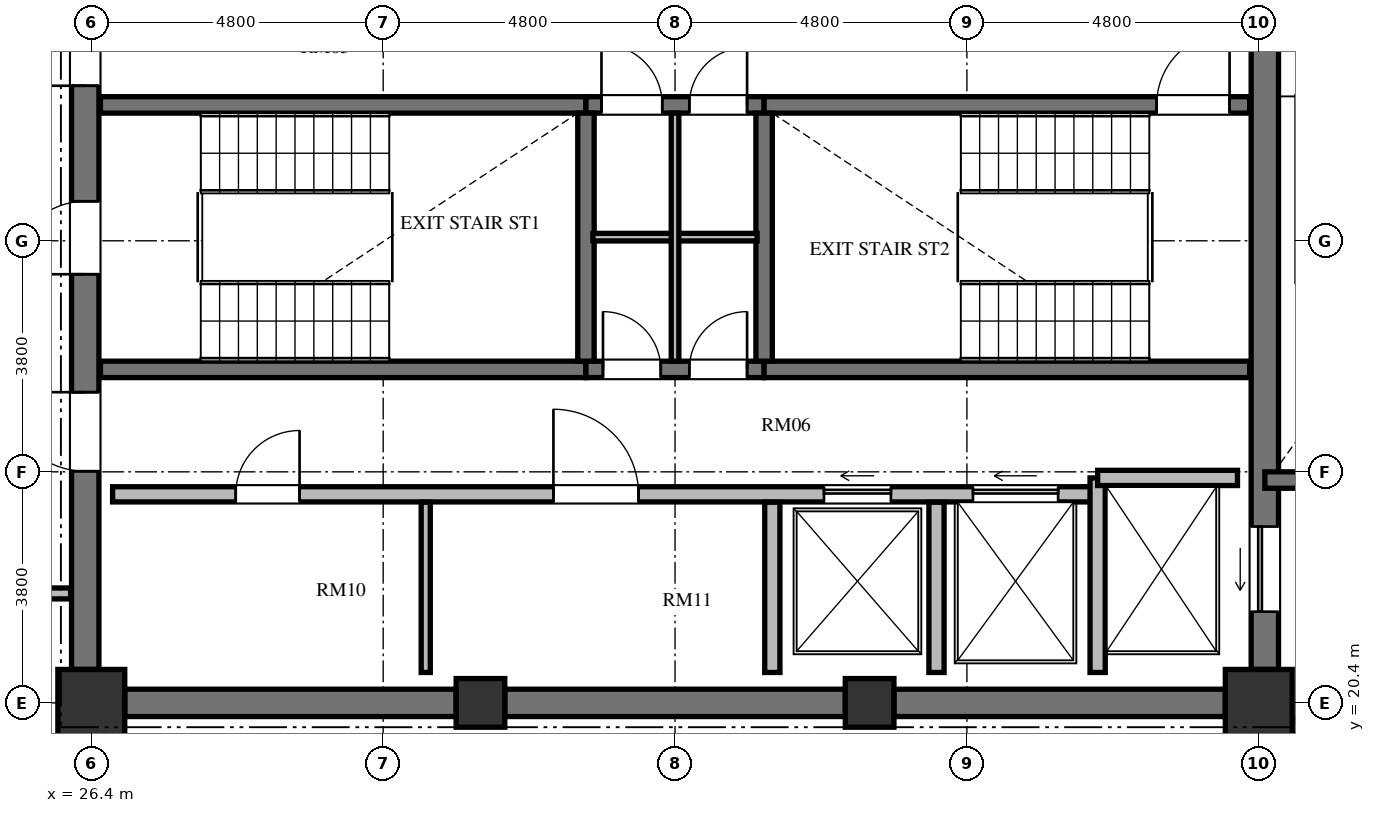
"""IFC4 building model, lengths in metres.
Left out: names, types, materials, properties, quantities, classifications, styles, units other than length and angle.
Written with IfcOpenShell. Run it as: python <this file> out.ifc"""

import sys

from ifc_helpers import new_model, si_unit, direction, frame, frame_2d, origin, origin_2d, place, context, subcontext, project, spatial, rectangle, extrude, element, fill, save


model = new_model("IFC4")
c1 = context("Model", 3, precision=1e-05, world=origin(), true_north=direction((0.0, 1.0)))
c2 = subcontext(c1, "Body", "Model", "MODEL_VIEW")
j1 = project(units=[si_unit("LENGTHUNIT", "METRE"), si_unit("PLANEANGLEUNIT", "RADIAN")], contexts=[c1])
p1 = place(None, origin())
s1 = spatial("IfcSite", under=j1, at=p1, CompositionType="ELEMENT")
p2 = place(p1, origin())
s2 = spatial("IfcBuilding", under=s1, at=p2, CompositionType="ELEMENT")
p3 = place(p2, frame((0.0, 0.0, 280.56)))
s3 = spatial("IfcBuildingStorey", under=s2, at=p3, CompositionType="ELEMENT", Elevation=280.56)
p4 = place(p3, frame((26.4, 20.4, 0.0), z_axis=(0.0, 0.0, 1.0), x_axis=(1.0, 0.0, 0.0)))
e1 = element("IfcColumn", 1, at=p4, inside=s3, PredefinedType="COLUMN", context=c2, shape_type="SweptSolid", body=[
    extrude(rectangle(XDim=1.1, YDim=1.1, at=origin_2d()), origin(), (0.0, 0.0, 1.0), 3.648),
])
for number, where, z_axis, x_axis in (
    (2, (32.8, 20.4, 0.0), (0.0, 0.0, 1.0), (1.0, 0.0, 0.0)),
    (3, (39.2, 20.4, 0.0), (0.0, 0.0, 1.0), (1.0, 0.0, 0.0)),
):
    element("IfcColumn", number, at=place(p3, frame(where, z_axis=z_axis, x_axis=x_axis)), inside=s3, PredefinedType="COLUMN", context=c2, shape_type="SweptSolid", body=[
        extrude(rectangle(XDim=0.8, YDim=0.8, at=origin_2d()), origin(), (0.0, 0.0, 1.0), 3.648),
    ])
p5 = place(p3, frame((45.6, 20.4, 0.0), z_axis=(0.0, 0.0, 1.0), x_axis=(1.0, 0.0, 0.0)))
e4 = element("IfcColumn", 4, at=p5, inside=s3, PredefinedType="COLUMN", context=c2, shape_type="SweptSolid", body=[
    extrude(rectangle(XDim=1.1, YDim=1.1, at=origin_2d()), origin(), (0.0, 0.0, 1.0), 3.648),
])
p6 = place(p3, frame((26.3, 20.95, 0.0), z_axis=(0.0, 0.0, 1.0), x_axis=(0.0, 1.0, 0.0)))
e5 = element("IfcWall", 5, at=p6, inside=s3, PredefinedType="SHEAR", context=c2, shape_type="SweptSolid", body=[
    extrude(rectangle(XDim=14.1, YDim=0.45, at=frame_2d((7.05, 0.0))), origin(), (0.0, 0.0, 1.0), 3.648),
])
p7 = place(p6, frame((6.5, 0.0, 0.0)))
e6 = element("IfcOpeningElement", 6, at=p7, cuts=e5, PredefinedType="OPENING", context=c2, shape_type="SweptSolid", body=[
    extrude(rectangle(XDim=1.2, YDim=2.15, at=frame_2d((0.6, 1.075))), frame((0.0, 0.235, 0.0), z_axis=(0.0, -1.0, 0.0), x_axis=(1.0, 0.0, 0.0)), (0.0, 0.0, 1.0), 0.47),
])
p8 = place(p6, frame((9.6, 0.0, 0.0)))
e7 = element("IfcOpeningElement", 7, at=p8, cuts=e5, PredefinedType="OPENING", context=c2, shape_type="SweptSolid", body=[
    extrude(rectangle(XDim=1.3, YDim=2.2, at=frame_2d((0.65, 1.1))), frame((0.0, 0.235, 0.0), z_axis=(0.0, -1.0, 0.0), x_axis=(1.0, 0.0, 0.0)), (0.0, 0.0, 1.0), 0.47),
])
p9 = place(p6, frame((3.26, 0.0, 0.0)))
e8 = element("IfcOpeningElement", 8, at=p9, cuts=e5, PredefinedType="OPENING", context=c2, shape_type="SweptSolid", body=[
    extrude(rectangle(XDim=1.3, YDim=2.2, at=frame_2d((0.65, 1.1))), frame((0.0, 0.235, 0.0), z_axis=(0.0, -1.0, 0.0), x_axis=(1.0, 0.0, 0.0)), (0.0, 0.0, 1.0), 0.47),
])
p10 = place(p3, frame((45.7, 20.95, 0.0), z_axis=(0.0, 0.0, 1.0), x_axis=(0.0, 1.0, 0.0)))
e9 = element("IfcWall", 9, at=p10, inside=s3, PredefinedType="SHEAR", context=c2, shape_type="SweptSolid", body=[
    extrude(rectangle(XDim=14.1, YDim=0.45, at=frame_2d((7.05, 0.0))), origin(), (0.0, 0.0, 1.0), 3.648),
])
p11 = place(p10, frame((11.75, 0.0, 0.0)))
e10 = element("IfcOpeningElement", 10, at=p11, cuts=e9, PredefinedType="OPENING", context=c2, shape_type="SweptSolid", body=[
    extrude(rectangle(XDim=1.4, YDim=2.3, at=frame_2d((0.7, 1.15))), frame((0.0, 0.235, 0.0), z_axis=(0.0, -1.0, 0.0), x_axis=(1.0, 0.0, 0.0)), (0.0, 0.0, 1.0), 0.47),
])
p12 = place(p10, frame((0.95, 0.0, 0.0)))
e11 = element("IfcOpeningElement", 11, at=p12, cuts=e9, PredefinedType="OPENING", context=c2, shape_type="SweptSolid", body=[
    extrude(rectangle(XDim=1.4, YDim=2.3, at=frame_2d((0.7, 1.15))), frame((0.0, 0.235, 0.0), z_axis=(0.0, -1.0, 0.0), x_axis=(1.0, 0.0, 0.0)), (0.0, 0.0, 1.0), 0.47),
])
p13 = place(p3, frame((26.95, 20.4, 0.0), z_axis=(0.0, 0.0, 1.0), x_axis=(1.0, 0.0, 0.0)))
e12 = element("IfcWall", 12, at=p13, inside=s3, PredefinedType="SHEAR", context=c2, shape_type="SweptSolid", body=[
    extrude(rectangle(XDim=5.45, YDim=0.45, at=frame_2d((2.725, 0.0))), origin(), (0.0, 0.0, 1.0), 3.648),
])
p14 = place(p3, frame((33.2, 20.4, 0.0), z_axis=(0.0, 0.0, 1.0), x_axis=(1.0, 0.0, 0.0)))
e13 = element("IfcWall", 13, at=p14, inside=s3, PredefinedType="SHEAR", context=c2, shape_type="SweptSolid", body=[
    extrude(rectangle(XDim=5.6, YDim=0.45, at=frame_2d((2.8, 0.0))), origin(), (0.0, 0.0, 1.0), 3.648),
])
p15 = place(p3, frame((39.6, 20.4, 0.0), z_axis=(0.0, 0.0, 1.0), x_axis=(1.0, 0.0, 0.0)))
e14 = element("IfcWall", 14, at=p15, inside=s3, PredefinedType="SHEAR", context=c2, shape_type="SweptSolid", body=[
    extrude(rectangle(XDim=5.45, YDim=0.45, at=frame_2d((2.725, 0.0))), origin(), (0.0, 0.0, 1.0), 3.648),
])
p16 = place(p3, frame((26.55, 30.235, 0.0), z_axis=(0.0, 0.0, 1.0), x_axis=(1.0, 0.0, 0.0)))
e15 = element("IfcWall", 15, at=p16, inside=s3, PredefinedType="SHEAR", context=c2, shape_type="SweptSolid", body=[
    extrude(rectangle(XDim=7.985, YDim=0.27, at=frame_2d((3.992, 0.0))), origin(), (0.0, 0.0, 1.0), 3.648),
])
p17 = place(p3, frame((34.535, 30.235, 0.0), z_axis=(0.0, 0.0, 1.0), x_axis=(1.0, 0.0, 0.0)))
e16 = element("IfcWall", 16, at=p17, inside=s3, PredefinedType="SHEAR", context=c2, shape_type="SweptSolid", body=[
    extrude(rectangle(XDim=2.93, YDim=0.27, at=frame_2d((1.465, 0.0))), origin(), (0.0, 0.0, 1.0), 3.648),
])
p18 = place(p17, frame((0.255, 0.0, 0.0)))
e17 = element("IfcOpeningElement", 17, at=p18, cuts=e16, PredefinedType="OPENING", context=c2, shape_type="SweptSolid", body=[
    extrude(rectangle(XDim=1.0, YDim=2.1, at=frame_2d((0.5, 1.05))), frame((0.0, 0.145, 0.0), z_axis=(0.0, -1.0, 0.0), x_axis=(1.0, 0.0, 0.0)), (0.0, 0.0, 1.0), 0.29),
])
p19 = place(p17, frame((1.7, 0.0, 0.0)))
e18 = element("IfcOpeningElement", 18, at=p19, cuts=e16, PredefinedType="OPENING", context=c2, shape_type="SweptSolid", body=[
    extrude(rectangle(XDim=0.95, YDim=2.1, at=frame_2d((0.475, 1.05))), frame((0.0, 0.145, 0.0), z_axis=(0.0, -1.0, 0.0), x_axis=(1.0, 0.0, 0.0)), (0.0, 0.0, 1.0), 0.29),
])
p20 = place(p3, frame((37.465, 30.235, 0.0), z_axis=(0.0, 0.0, 1.0), x_axis=(1.0, 0.0, 0.0)))
e19 = element("IfcWall", 19, at=p20, inside=s3, PredefinedType="SHEAR", context=c2, shape_type="SweptSolid", body=[
    extrude(rectangle(XDim=7.985, YDim=0.27, at=frame_2d((3.992, 0.0))), origin(), (0.0, 0.0, 1.0), 3.648),
])
p21 = place(p20, frame((6.455, 0.0, 0.0)))
e20 = element("IfcOpeningElement", 20, at=p21, cuts=e19, PredefinedType="OPENING", context=c2, shape_type="SweptSolid", body=[
    extrude(rectangle(XDim=1.2, YDim=2.15, at=frame_2d((0.6, 1.075))), frame((0.0, 0.145, 0.0), z_axis=(0.0, -1.0, 0.0), x_axis=(1.0, 0.0, 0.0)), (0.0, 0.0, 1.0), 0.29),
])
p22 = place(p3, frame((26.55, 25.885, 0.0), z_axis=(0.0, 0.0, 1.0), x_axis=(1.0, 0.0, 0.0)))
e21 = element("IfcWall", 21, at=p22, inside=s3, PredefinedType="SHEAR", context=c2, shape_type="SweptSolid", body=[
    extrude(rectangle(XDim=7.985, YDim=0.27, at=frame_2d((3.992, 0.0))), origin(), (0.0, 0.0, 1.0), 3.648),
])
p23 = place(p3, frame((34.535, 25.885, 0.0), z_axis=(0.0, 0.0, 1.0), x_axis=(1.0, 0.0, 0.0)))
e22 = element("IfcWall", 22, at=p23, inside=s3, PredefinedType="SHEAR", context=c2, shape_type="SweptSolid", body=[
    extrude(rectangle(XDim=2.93, YDim=0.27, at=frame_2d((1.465, 0.0))), origin(), (0.0, 0.0, 1.0), 3.648),
])
p24 = place(p23, frame((0.28, 0.0, 0.0)))
e23 = element("IfcOpeningElement", 23, at=p24, cuts=e22, PredefinedType="OPENING", context=c2, shape_type="SweptSolid", body=[
    extrude(rectangle(XDim=0.95, YDim=2.1, at=frame_2d((0.475, 1.05))), frame((0.0, 0.145, 0.0), z_axis=(0.0, -1.0, 0.0), x_axis=(1.0, 0.0, 0.0)), (0.0, 0.0, 1.0), 0.29),
])
p25 = place(p23, frame((1.7, 0.0, 0.0)))
e24 = element("IfcOpeningElement", 24, at=p25, cuts=e22, PredefinedType="OPENING", context=c2, shape_type="SweptSolid", body=[
    extrude(rectangle(XDim=0.95, YDim=2.1, at=frame_2d((0.475, 1.05))), frame((0.0, 0.145, 0.0), z_axis=(0.0, -1.0, 0.0), x_axis=(1.0, 0.0, 0.0)), (0.0, 0.0, 1.0), 0.29),
])
p26 = place(p3, frame((37.465, 25.885, 0.0), z_axis=(0.0, 0.0, 1.0), x_axis=(1.0, 0.0, 0.0)))
e25 = element("IfcWall", 25, at=p26, inside=s3, PredefinedType="SHEAR", context=c2, shape_type="SweptSolid", body=[
    extrude(rectangle(XDim=7.985, YDim=0.27, at=frame_2d((3.992, 0.0))), origin(), (0.0, 0.0, 1.0), 3.648),
])
for number, where, z_axis, x_axis in (
    (26, (34.535, 26.02, 0.0), (0.0, 0.0, 1.0), (0.0, 1.0, 0.0)),
    (27, (37.465, 26.02, 0.0), (0.0, 0.0, 1.0), (0.0, 1.0, 0.0)),
):
    element("IfcWall", number, at=place(p3, frame(where, z_axis=z_axis, x_axis=x_axis)), inside=s3, PredefinedType="SHEAR", context=c2, shape_type="SweptSolid", body=[
        extrude(rectangle(XDim=4.08, YDim=0.27, at=frame_2d((2.04, 0.0))), origin(), (0.0, 0.0, 1.0), 3.648),
    ])
p27 = place(p3, frame((34.65, 28.06, 0.0), z_axis=(0.0, 0.0, 1.0), x_axis=(1.0, 0.0, 0.0)))
e28 = element("IfcWall", 28, at=p27, inside=s3, PredefinedType="PARTITIONING", context=c2, shape_type="SweptSolid", body=[
    extrude(rectangle(XDim=2.7, YDim=0.125, at=frame_2d((1.35, 0.0))), origin(), (0.0, 0.0, 1.0), 3.448),
])
p28 = place(p3, frame((36.0, 26.02, 0.0), z_axis=(0.0, 0.0, 1.0), x_axis=(0.0, 1.0, 0.0)))
e29 = element("IfcWall", 29, at=p28, inside=s3, PredefinedType="PARTITIONING", context=c2, shape_type="SweptSolid", body=[
    extrude(rectangle(XDim=4.08, YDim=0.125, at=frame_2d((2.04, 0.0))), origin(), (0.0, 0.0, 1.0), 3.448),
])
p29 = place(p3, frame((26.75, 23.83, 0.0), z_axis=(0.0, 0.0, 1.0), x_axis=(1.0, 0.0, 0.0)))
e30 = element("IfcWall", 30, at=p29, inside=s3, PredefinedType="SOLIDWALL", context=c2, shape_type="SweptSolid", body=[
    extrude(rectangle(XDim=16.2, YDim=0.25, at=frame_2d((8.1, 0.0))), origin(), (0.0, 0.0, 1.0), 3.448),
])
p30 = place(p29, frame((2.025, 0.0, 0.0)))
e31 = element("IfcOpeningElement", 31, at=p30, cuts=e30, PredefinedType="OPENING", context=c2, shape_type="SweptSolid", body=[
    extrude(rectangle(XDim=1.05, YDim=2.15, at=frame_2d((0.525, 1.075))), frame((0.0, 0.135, 0.0), z_axis=(0.0, -1.0, 0.0), x_axis=(1.0, 0.0, 0.0)), (0.0, 0.0, 1.0), 0.27),
])
p31 = place(p29, frame((7.25, 0.0, 0.0)))
e32 = element("IfcOpeningElement", 32, at=p31, cuts=e30, PredefinedType="OPENING", context=c2, shape_type="SweptSolid", body=[
    extrude(rectangle(XDim=1.4, YDim=2.2, at=frame_2d((0.7, 1.1))), frame((0.0, 0.135, 0.0), z_axis=(0.0, -1.0, 0.0), x_axis=(1.0, 0.0, 0.0)), (0.0, 0.0, 1.0), 0.27),
])
p32 = place(p29, frame((11.7, 0.0, 0.0)))
e33 = element("IfcOpeningElement", 33, at=p32, cuts=e30, PredefinedType="OPENING", context=c2, shape_type="SweptSolid", body=[
    extrude(rectangle(XDim=1.1, YDim=2.2, at=frame_2d((0.55, 1.1))), frame((0.0, 0.135, 0.0), z_axis=(0.0, -1.0, 0.0), x_axis=(1.0, 0.0, 0.0)), (0.0, 0.0, 1.0), 0.27),
])
p33 = place(p29, frame((14.15, 0.0, 0.0)))
e34 = element("IfcOpeningElement", 34, at=p33, cuts=e30, PredefinedType="OPENING", context=c2, shape_type="SweptSolid", body=[
    extrude(rectangle(XDim=1.4, YDim=2.3, at=frame_2d((0.7, 1.15))), frame((0.0, 0.135, 0.0), z_axis=(0.0, -1.0, 0.0), x_axis=(1.0, 0.0, 0.0)), (0.0, 0.0, 1.0), 0.27),
])
p34 = place(p3, frame((42.95, 20.9, 0.0), z_axis=(0.0, 0.0, 1.0), x_axis=(0.0, 1.0, 0.0)))
e35 = element("IfcWall", 35, at=p34, inside=s3, PredefinedType="SOLIDWALL", context=c2, shape_type="SweptSolid", body=[
    extrude(rectangle(XDim=3.2, YDim=0.25, at=frame_2d((1.6, 0.0))), origin(), (0.0, 0.0, 1.0), 3.448),
])
p35 = place(p3, frame((42.95, 24.1, 0.0), z_axis=(0.0, 0.0, 1.0), x_axis=(1.0, 0.0, 0.0)))
e36 = element("IfcWall", 36, at=p35, inside=s3, PredefinedType="SOLIDWALL", context=c2, shape_type="SweptSolid", body=[
    extrude(rectangle(XDim=2.3, YDim=0.25, at=frame_2d((1.15, 0.0))), origin(), (0.0, 0.0, 1.0), 3.448),
])
for number, where, z_axis, x_axis in (
    (37, (37.6, 20.9, 0.0), (0.0, 0.0, 1.0), (0.0, 1.0, 0.0)),
    (38, (40.3, 20.9, 0.0), (0.0, 0.0, 1.0), (0.0, 1.0, 0.0)),
):
    element("IfcWall", number, at=place(p3, frame(where, z_axis=z_axis, x_axis=x_axis)), inside=s3, PredefinedType="SOLIDWALL", context=c2, shape_type="SweptSolid", body=[
        extrude(rectangle(XDim=2.8, YDim=0.25, at=frame_2d((1.4, 0.0))), origin(), (0.0, 0.0, 1.0), 3.448),
    ])
p36 = place(p3, frame((31.9, 20.9, 0.0), z_axis=(0.0, 0.0, 1.0), x_axis=(0.0, 1.0, 0.0)))
e39 = element("IfcWall", 39, at=p36, inside=s3, PredefinedType="PARTITIONING", context=c2, shape_type="SweptSolid", body=[
    extrude(rectangle(XDim=2.8, YDim=0.15, at=frame_2d((1.4, 0.0))), origin(), (0.0, 0.0, 1.0), 3.448),
])
p37 = place(p3, frame((45.7, 24.065, 0.0), z_axis=(0.0, 0.0, 1.0), x_axis=(1.0, 0.0, 0.0)))
e40 = element("IfcWall", 40, at=p37, inside=s3, PredefinedType="SHEAR", context=c2, shape_type="SweptSolid", body=[
    extrude(rectangle(XDim=4.715, YDim=0.27, at=frame_2d((2.357, 0.0))), origin(), (0.0, 0.0, 1.0), 3.648),
])
p38 = place(p3, frame((45.7, 20.02, 0.0), z_axis=(0.0, 0.0, 1.0), x_axis=(1.0, 0.0, 0.0)))
e41 = element("IfcWall", 41, at=p38, inside=s3, PredefinedType="SOLIDWALL", context=c2, shape_type="SweptSolid", body=[
    extrude(rectangle(XDim=4.715, YDim=0.25, at=frame_2d((2.357, 0.0))), origin(), (0.0, 0.0, 1.0), 3.448),
])
p39 = place(p3, frame((26.06, 22.2, 0.0), z_axis=(0.0, 0.0, 1.0), x_axis=(-1.0, 0.0, 0.0)))
e42 = element("IfcWall", 42, at=p39, inside=s3, PredefinedType="PARTITIONING", context=c2, shape_type="SweptSolid", body=[
    extrude(rectangle(XDim=2.35, YDim=0.18, at=frame_2d((1.175, 0.0))), origin(), (0.0, 0.0, 1.0), 3.448),
])
p40 = place(p7, origin())
e43 = element("IfcDoor", 43, at=p40, inside=s3, OperationType="SINGLE_SWING_LEFT", PredefinedType="DOOR", context=c2, shape_type="SweptSolid", body=[
    extrude(rectangle(XDim=1.2, YDim=2.15, at=frame_2d((0.6, 1.075))), frame((0.0, 0.025, 0.0), z_axis=(0.0, -1.0, 0.0), x_axis=(1.0, 0.0, 0.0)), (0.0, 0.0, 1.0), 0.05),
])
fill(e6, e43)
p41 = place(p21, origin())
e44 = element("IfcDoor", 44, at=p41, inside=s3, OperationType="SINGLE_SWING_RIGHT", PredefinedType="DOOR", context=c2, shape_type="SweptSolid", body=[
    extrude(rectangle(XDim=1.2, YDim=2.15, at=frame_2d((0.6, 1.075))), frame((0.0, 0.025, 0.0), z_axis=(0.0, -1.0, 0.0), x_axis=(1.0, 0.0, 0.0)), (0.0, 0.0, 1.0), 0.05),
])
fill(e20, e44)
p42 = place(p24, origin())
e45 = element("IfcDoor", 45, at=p42, inside=s3, OperationType="SINGLE_SWING_LEFT", PredefinedType="DOOR", context=c2, shape_type="SweptSolid", body=[
    extrude(rectangle(XDim=0.95, YDim=2.1, at=frame_2d((0.475, 1.05))), frame((0.0, 0.025, 0.0), z_axis=(0.0, -1.0, 0.0), x_axis=(1.0, 0.0, 0.0)), (0.0, 0.0, 1.0), 0.05),
])
fill(e23, e45)
p43 = place(p25, origin())
e46 = element("IfcDoor", 46, at=p43, inside=s3, OperationType="SINGLE_SWING_RIGHT", PredefinedType="DOOR", context=c2, shape_type="SweptSolid", body=[
    extrude(rectangle(XDim=0.95, YDim=2.1, at=frame_2d((0.475, 1.05))), frame((0.0, 0.025, 0.0), z_axis=(0.0, -1.0, 0.0), x_axis=(1.0, 0.0, 0.0)), (0.0, 0.0, 1.0), 0.05),
])
fill(e24, e46)
p44 = place(p18, origin())
e47 = element("IfcDoor", 47, at=p44, inside=s3, OperationType="SINGLE_SWING_LEFT", PredefinedType="DOOR", context=c2, shape_type="SweptSolid", body=[
    extrude(rectangle(XDim=1.0, YDim=2.1, at=frame_2d((0.5, 1.05))), frame((0.0, 0.025, 0.0), z_axis=(0.0, -1.0, 0.0), x_axis=(1.0, 0.0, 0.0)), (0.0, 0.0, 1.0), 0.05),
])
fill(e17, e47)
p45 = place(p19, origin())
e48 = element("IfcDoor", 48, at=p45, inside=s3, OperationType="SINGLE_SWING_RIGHT", PredefinedType="DOOR", context=c2, shape_type="SweptSolid", body=[
    extrude(rectangle(XDim=0.95, YDim=2.1, at=frame_2d((0.475, 1.05))), frame((0.0, 0.025, 0.0), z_axis=(0.0, -1.0, 0.0), x_axis=(1.0, 0.0, 0.0)), (0.0, 0.0, 1.0), 0.05),
])
fill(e18, e48)
p46 = place(p8, origin())
e49 = element("IfcDoor", 49, at=p46, inside=s3, OperationType="SINGLE_SWING_LEFT", PredefinedType="DOOR", context=c2, shape_type="SweptSolid", body=[
    extrude(rectangle(XDim=1.3, YDim=2.2, at=frame_2d((0.65, 1.1))), frame((0.0, 0.025, 0.0), z_axis=(0.0, -1.0, 0.0), x_axis=(1.0, 0.0, 0.0)), (0.0, 0.0, 1.0), 0.05),
])
fill(e7, e49)
p47 = place(p9, origin())
e50 = element("IfcDoor", 50, at=p47, inside=s3, OperationType="SINGLE_SWING_RIGHT", PredefinedType="DOOR", context=c2, shape_type="SweptSolid", body=[
    extrude(rectangle(XDim=1.3, YDim=2.2, at=frame_2d((0.65, 1.1))), frame((0.0, 0.025, 0.0), z_axis=(0.0, -1.0, 0.0), x_axis=(1.0, 0.0, 0.0)), (0.0, 0.0, 1.0), 0.05),
])
fill(e8, e50)
p48 = place(p30, origin())
e51 = element("IfcDoor", 51, at=p48, inside=s3, OperationType="SINGLE_SWING_RIGHT", PredefinedType="DOOR", context=c2, shape_type="SweptSolid", body=[
    extrude(rectangle(XDim=1.05, YDim=2.15, at=frame_2d((0.525, 1.075))), frame((0.0, 0.025, 0.0), z_axis=(0.0, -1.0, 0.0), x_axis=(1.0, 0.0, 0.0)), (0.0, 0.0, 1.0), 0.05),
])
fill(e31, e51)
p49 = place(p31, origin())
e52 = element("IfcDoor", 52, at=p49, inside=s3, OperationType="SINGLE_SWING_LEFT", PredefinedType="DOOR", context=c2, shape_type="SweptSolid", body=[
    extrude(rectangle(XDim=1.4, YDim=2.2, at=frame_2d((0.7, 1.1))), frame((0.0, 0.025, 0.0), z_axis=(0.0, -1.0, 0.0), x_axis=(1.0, 0.0, 0.0)), (0.0, 0.0, 1.0), 0.05),
])
fill(e32, e52)
p50 = place(p32, origin())
e53 = element("IfcDoor", 53, at=p50, inside=s3, OperationType="SLIDING_TO_LEFT", PredefinedType="DOOR", context=c2, shape_type="SweptSolid", body=[
    extrude(rectangle(XDim=1.1, YDim=2.2, at=frame_2d((0.55, 1.1))), frame((0.0, 0.025, 0.0), z_axis=(0.0, -1.0, 0.0), x_axis=(1.0, 0.0, 0.0)), (0.0, 0.0, 1.0), 0.05),
])
fill(e33, e53)
p51 = place(p12, origin())
e54 = element("IfcDoor", 54, at=p51, inside=s3, OperationType="SLIDING_TO_LEFT", PredefinedType="DOOR", context=c2, shape_type="SweptSolid", body=[
    extrude(rectangle(XDim=1.4, YDim=2.3, at=frame_2d((0.7, 1.15))), frame((0.0, 0.025, 0.0), z_axis=(0.0, -1.0, 0.0), x_axis=(1.0, 0.0, 0.0)), (0.0, 0.0, 1.0), 0.05),
])
fill(e11, e54)
p52 = place(p33, origin())
e55 = element("IfcDoor", 55, at=p52, inside=s3, OperationType="SLIDING_TO_LEFT", PredefinedType="DOOR", context=c2, shape_type="SweptSolid", body=[
    extrude(rectangle(XDim=1.4, YDim=2.3, at=frame_2d((0.7, 1.15))), frame((0.0, 0.025, 0.0), z_axis=(0.0, -1.0, 0.0), x_axis=(1.0, 0.0, 0.0)), (0.0, 0.0, 1.0), 0.05),
])
fill(e34, e55)
save(model, sys.argv[1])
